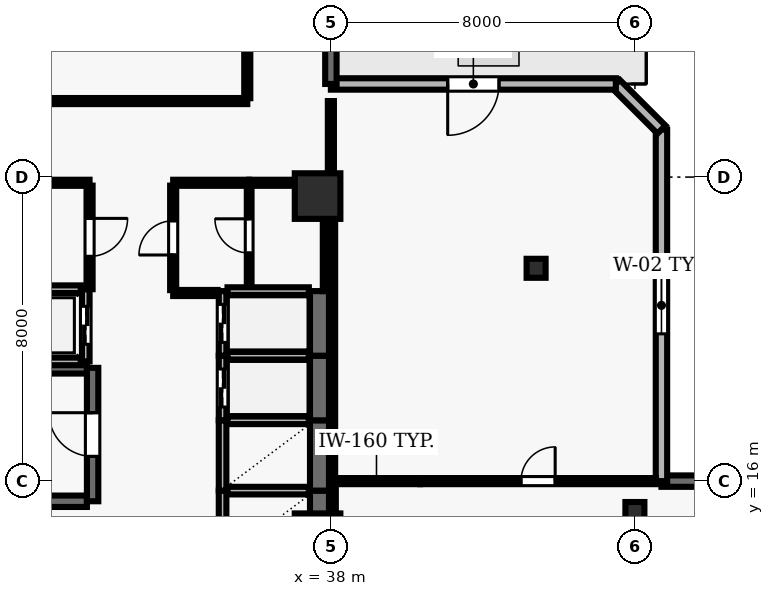
"""IFC4 building model, lengths in metres.
Left out: names, types, materials, properties, quantities, classifications, styles, units other than length and angle.
Written with IfcOpenShell. Run it as: python <this file> out.ifc"""

import sys

from ifc_helpers import new_model, si_unit, direction, frame, frame_2d, origin, origin_2d, place, context, subcontext, project, spatial, rectangle, hollow_rectangle, extrude, element, fill, save


model = new_model("IFC4")
c1 = context("Model", 3, precision=1e-05, world=origin(), true_north=direction((0.0, 1.0)))
c2 = subcontext(c1, "Body", "Model", "MODEL_VIEW")
j1 = project(units=[si_unit("LENGTHUNIT", "METRE"), si_unit("PLANEANGLEUNIT", "RADIAN")], contexts=[c1])
p1 = place(None, origin())
s1 = spatial("IfcSite", under=j1, at=p1, CompositionType="ELEMENT")
p2 = place(p1, origin())
s2 = spatial("IfcBuilding", under=s1, at=p2, CompositionType="ELEMENT")
p3 = place(p2, frame((0.0, 0.0, 134.6)))
s3 = spatial("IfcBuildingStorey", under=s2, at=p3, CompositionType="ELEMENT", Elevation=134.6)
for number, where, z_axis, x_axis in (
    (1, (37.65, 14.55, 0.0), (0.0, 0.0, 1.0), (1.0, 0.0, 0.0)),
    (2, (37.65, 23.5, 0.0), (0.0, 0.0, 1.0), (1.0, 0.0, 0.0)),
):
    element("IfcColumn", number, at=place(p3, frame(where, z_axis=z_axis, x_axis=x_axis)), inside=s3, PredefinedType="COLUMN", context=c2, shape_type="SweptSolid", body=[
        extrude(rectangle(XDim=1.2, YDim=1.2, at=origin_2d()), origin(), (0.0, 0.0, 1.0), 3.9),
    ])
for number, where, z_axis, x_axis in (
    (3, (46.0, 15.2, 0.0), (0.0, 0.0, 1.0), (1.0, 0.0, 0.0)),
    (4, (43.4, 21.6, 0.0), (0.0, 0.0, 1.0), (1.0, 0.0, 0.0)),
):
    element("IfcColumn", number, at=place(p3, frame(where, z_axis=z_axis, x_axis=x_axis)), inside=s3, PredefinedType="COLUMN", context=c2, shape_type="SweptSolid", body=[
        extrude(hollow_rectangle(XDim=0.5, YDim=0.5, WallThickness=0.025, at=origin_2d()), origin(), (0.0, 0.0, 1.0), 3.9),
    ])
p4 = place(p3, frame((68.1, 16.0, 0.0), z_axis=(0.0, 0.0, 1.0), x_axis=(-1.0, 0.0, 0.0)))
e5 = element("IfcWall", 5, at=p4, inside=s3, PredefinedType="SOLIDWALL", context=c2, shape_type="SweptSolid", body=[
    extrude(rectangle(XDim=21.401, YDim=0.3, at=frame_2d((10.701, 0.0))), origin(), (0.0, 0.0, 1.0), 3.69),
])
p5 = place(p4, frame((11.974, 0.0, 0.0)))
e6 = element("IfcOpeningElement", 6, at=p5, cuts=e5, PredefinedType="OPENING", context=c2, shape_type="SweptSolid", body=[
    extrude(rectangle(XDim=1.0, YDim=2.2, at=frame_2d((0.5, 1.1))), frame((0.0, 0.16, 0.0), z_axis=(0.0, -1.0, 0.0), x_axis=(1.0, 0.0, 0.0)), (0.0, 0.0, 1.0), 0.32),
])
p6 = place(p4, frame((2.967, 0.0, 0.9)))
e7 = element("IfcOpeningElement", 7, at=p6, cuts=e5, PredefinedType="OPENING", context=c2, shape_type="SweptSolid", body=[
    extrude(rectangle(XDim=1.2, YDim=1.6, at=frame_2d((0.6, 0.8))), frame((0.0, 0.16, 0.0), z_axis=(0.0, -1.0, 0.0), x_axis=(1.0, 0.0, 0.0)), (0.0, 0.0, 1.0), 0.32),
])
p7 = place(p4, frame((10.1, 0.0, 0.9)))
e8 = element("IfcOpeningElement", 8, at=p7, cuts=e5, PredefinedType="OPENING", context=c2, shape_type="SweptSolid", body=[
    extrude(rectangle(XDim=1.2, YDim=1.6, at=frame_2d((0.6, 0.8))), frame((0.0, 0.16, 0.0), z_axis=(0.0, -1.0, 0.0), x_axis=(1.0, 0.0, 0.0)), (0.0, 0.0, 1.0), 0.32),
])
p8 = place(p4, frame((17.234, 0.0, 0.9)))
e9 = element("IfcOpeningElement", 9, at=p8, cuts=e5, PredefinedType="OPENING", context=c2, shape_type="SweptSolid", body=[
    extrude(rectangle(XDim=1.2, YDim=1.6, at=frame_2d((0.6, 0.8))), frame((0.0, 0.16, 0.0), z_axis=(0.0, -1.0, 0.0), x_axis=(1.0, 0.0, 0.0)), (0.0, 0.0, 1.0), 0.32),
])
p9 = place(p3, frame((46.699, 16.0, 0.0), z_axis=(0.0, 0.0, 1.0), x_axis=(0.0, 1.0, 0.0)))
e10 = element("IfcWall", 10, at=p9, inside=s3, PredefinedType="SOLIDWALL", context=c2, shape_type="SweptSolid", body=[
    extrude(rectangle(XDim=9.25, YDim=0.3, at=frame_2d((4.625, 0.0))), origin(), (0.0, 0.0, 1.0), 3.69),
])
p10 = place(p9, frame((3.875, 0.0, 0.9)))
e11 = element("IfcOpeningElement", 11, at=p10, cuts=e10, PredefinedType="OPENING", context=c2, shape_type="SweptSolid", body=[
    extrude(rectangle(XDim=1.5, YDim=1.6, at=frame_2d((0.75, 0.8))), frame((0.0, 0.16, 0.0), z_axis=(0.0, -1.0, 0.0), x_axis=(1.0, 0.0, 0.0)), (0.0, 0.0, 1.0), 0.32),
])
p11 = place(p3, frame((46.699, 25.25, 0.0), z_axis=(0.0, 0.0, 1.0), x_axis=(-0.707106781187, 0.707106781187, 0.0)))
e12 = element("IfcWall", 12, at=p11, inside=s3, PredefinedType="SOLIDWALL", context=c2, shape_type="SweptSolid", body=[
    extrude(rectangle(XDim=1.697, YDim=0.3, at=frame_2d((0.849, 0.0))), origin(), (0.0, 0.0, 1.0), 3.69),
])
p12 = place(p3, frame((45.499, 26.45, 0.0), z_axis=(0.0, 0.0, 1.0), x_axis=(-1.0, 0.0, 0.0)))
e13 = element("IfcWall", 13, at=p12, inside=s3, PredefinedType="SOLIDWALL", context=c2, shape_type="SweptSolid", body=[
    extrude(rectangle(XDim=7.499, YDim=0.3, at=frame_2d((3.75, 0.0))), origin(), (0.0, 0.0, 1.0), 3.69),
])
p13 = place(p12, frame((3.075, 0.0, 0.0)))
e14 = element("IfcOpeningElement", 14, at=p13, cuts=e13, PredefinedType="OPENING", context=c2, shape_type="SweptSolid", body=[
    extrude(rectangle(XDim=1.35, YDim=2.2, at=frame_2d((0.675, 1.1))), frame((0.0, 0.16, 0.0), z_axis=(0.0, -1.0, 0.0), x_axis=(1.0, 0.0, 0.0)), (0.0, 0.0, 1.0), 0.32),
])
p14 = place(p3, frame((38.0, 26.45, 0.0), z_axis=(0.0, 0.0, 1.0), x_axis=(0.0, 1.0, 0.0)))
e15 = element("IfcWall", 15, at=p14, inside=s3, PredefinedType="SOLIDWALL", context=c2, shape_type="SweptSolid", body=[
    extrude(rectangle(XDim=19.65, YDim=0.3, at=frame_2d((9.825, 0.0))), origin(), (0.0, 0.0, 1.0), 3.69),
])
p15 = place(p14, frame((11.25, 0.0, 0.0)))
e16 = element("IfcOpeningElement", 16, at=p15, cuts=e15, PredefinedType="OPENING", context=c2, shape_type="SweptSolid", body=[
    extrude(rectangle(XDim=1.0, YDim=2.2, at=frame_2d((0.5, 1.1))), frame((0.0, 0.16, 0.0), z_axis=(0.0, -1.0, 0.0), x_axis=(1.0, 0.0, 0.0)), (0.0, 0.0, 1.0), 0.32),
])
p16 = place(p14, frame((15.625, 0.0, 0.9)))
e17 = element("IfcOpeningElement", 17, at=p16, cuts=e15, PredefinedType="OPENING", context=c2, shape_type="SweptSolid", body=[
    extrude(rectangle(XDim=2.4, YDim=1.6, at=frame_2d((1.2, 0.8))), frame((0.0, 0.16, 0.0), z_axis=(0.0, -1.0, 0.0), x_axis=(1.0, 0.0, 0.0)), (0.0, 0.0, 1.0), 0.32),
])
for number, where, z_axis, x_axis in (
    (18, (31.58, 18.98, 0.0), (0.0, 0.0, 1.0), (-1.0, 0.0, 0.0)),
    (19, (23.22, 15.47, 0.0), (0.0, 0.0, 1.0), (1.0, 0.0, 0.0)),
):
    element("IfcWall", number, at=place(p3, frame(where, z_axis=z_axis, x_axis=x_axis)), inside=s3, PredefinedType="SHEAR", context=c2, shape_type="SweptSolid", body=[
        extrude(rectangle(XDim=8.36, YDim=0.3, at=frame_2d((4.18, 0.0))), origin(), (0.0, 0.0, 1.0), 3.69),
    ])
p17 = place(p3, frame((31.73, 15.47, 0.0), z_axis=(0.0, 0.0, 1.0), x_axis=(0.0, 1.0, 0.0)))
e20 = element("IfcWall", 20, at=p17, inside=s3, PredefinedType="SHEAR", context=c2, shape_type="SweptSolid", body=[
    extrude(rectangle(XDim=3.51, YDim=0.3, at=frame_2d((1.755, 0.0))), origin(), (0.0, 0.0, 1.0), 3.69),
])
p18 = place(p17, frame((1.18, 0.0, 0.0)))
e21 = element("IfcOpeningElement", 21, at=p18, cuts=e20, PredefinedType="OPENING", context=c2, shape_type="SweptSolid", body=[
    extrude(rectangle(XDim=1.15, YDim=2.15, at=frame_2d((0.575, 1.075))), frame((0.0, 0.16, 0.0), z_axis=(0.0, -1.0, 0.0), x_axis=(1.0, 0.0, 0.0)), (0.0, 0.0, 1.0), 0.32),
])
p19 = place(p3, frame((35.15, 15.75, 0.0), z_axis=(0.0, 0.0, 1.0), x_axis=(0.0, -1.0, 0.0)))
e22 = element("IfcWall", 22, at=p19, inside=s3, PredefinedType="SOLIDWALL", context=c2, shape_type="SweptSolid", body=[
    extrude(rectangle(XDim=1.85, YDim=0.2, at=frame_2d((0.925, 0.0))), origin(), (0.0, 0.0, 1.0), 3.69),
])
p20 = place(p3, frame((37.7, 13.9, 0.0), z_axis=(0.0, 0.0, 1.0), x_axis=(0.0, 1.0, 0.0)))
e23 = element("IfcWall", 23, at=p20, inside=s3, PredefinedType="SHEAR", context=c2, shape_type="SweptSolid", body=[
    extrude(rectangle(XDim=1.85, YDim=0.5, at=frame_2d((0.925, 0.0))), origin(), (0.0, 0.0, 1.0), 3.69),
])
p21 = place(p3, frame((37.42, 15.75, 0.0), z_axis=(0.0, 0.0, 1.0), x_axis=(-1.0, 0.0, 0.0)))
e24 = element("IfcWall", 24, at=p21, inside=s3, PredefinedType="SOLIDWALL", context=c2, shape_type="SweptSolid", body=[
    extrude(rectangle(XDim=2.14, YDim=0.2, at=frame_2d((1.07, 0.0))), origin(), (0.0, 0.0, 1.0), 3.69),
])
p22 = place(p3, frame((35.15, 17.6, 0.0), z_axis=(0.0, 0.0, 1.0), x_axis=(0.0, -1.0, 0.0)))
e25 = element("IfcWall", 25, at=p22, inside=s3, PredefinedType="SOLIDWALL", context=c2, shape_type="SweptSolid", body=[
    extrude(rectangle(XDim=1.85, YDim=0.2, at=frame_2d((0.925, 0.0))), origin(), (0.0, 0.0, 1.0), 3.69),
])
p23 = place(p3, frame((37.7, 15.75, 0.0), z_axis=(0.0, 0.0, 1.0), x_axis=(0.0, 1.0, 0.0)))
e26 = element("IfcWall", 26, at=p23, inside=s3, PredefinedType="SHEAR", context=c2, shape_type="SweptSolid", body=[
    extrude(rectangle(XDim=1.85, YDim=0.5, at=frame_2d((0.925, 0.0))), origin(), (0.0, 0.0, 1.0), 3.69),
])
p24 = place(p3, frame((37.42, 17.6, 0.0), z_axis=(0.0, 0.0, 1.0), x_axis=(-1.0, 0.0, 0.0)))
e27 = element("IfcWall", 27, at=p24, inside=s3, PredefinedType="SOLIDWALL", context=c2, shape_type="SweptSolid", body=[
    extrude(rectangle(XDim=2.14, YDim=0.2, at=frame_2d((1.07, 0.0))), origin(), (0.0, 0.0, 1.0), 3.69),
])
p25 = place(p3, frame((35.15, 19.3, 0.0), z_axis=(0.0, 0.0, 1.0), x_axis=(0.0, -1.0, 0.0)))
e28 = element("IfcWall", 28, at=p25, inside=s3, PredefinedType="SOLIDWALL", context=c2, shape_type="SweptSolid", body=[
    extrude(rectangle(XDim=1.7, YDim=0.2, at=frame_2d((0.85, 0.0))), origin(), (0.0, 0.0, 1.0), 3.69),
])
p26 = place(p25, frame((0.35, 0.0, 0.0)))
e29 = element("IfcOpeningElement", 29, at=p26, cuts=e28, PredefinedType="OPENING", context=c2, shape_type="SweptSolid", body=[
    extrude(rectangle(XDim=1.0, YDim=2.1, at=frame_2d((0.5, 1.05))), frame((0.0, 0.11, 0.0), z_axis=(0.0, -1.0, 0.0), x_axis=(1.0, 0.0, 0.0)), (0.0, 0.0, 1.0), 0.22),
])
p27 = place(p3, frame((37.7, 17.6, 0.0), z_axis=(0.0, 0.0, 1.0), x_axis=(0.0, 1.0, 0.0)))
e30 = element("IfcWall", 30, at=p27, inside=s3, PredefinedType="SHEAR", context=c2, shape_type="SweptSolid", body=[
    extrude(rectangle(XDim=1.7, YDim=0.5, at=frame_2d((0.85, 0.0))), origin(), (0.0, 0.0, 1.0), 3.69),
])
p28 = place(p3, frame((37.42, 19.3, 0.0), z_axis=(0.0, 0.0, 1.0), x_axis=(-1.0, 0.0, 0.0)))
e31 = element("IfcWall", 31, at=p28, inside=s3, PredefinedType="SOLIDWALL", context=c2, shape_type="SweptSolid", body=[
    extrude(rectangle(XDim=2.14, YDim=0.2, at=frame_2d((1.07, 0.0))), origin(), (0.0, 0.0, 1.0), 3.69),
])
p29 = place(p3, frame((35.15, 21.0, 0.0), z_axis=(0.0, 0.0, 1.0), x_axis=(0.0, -1.0, 0.0)))
e32 = element("IfcWall", 32, at=p29, inside=s3, PredefinedType="SOLIDWALL", context=c2, shape_type="SweptSolid", body=[
    extrude(rectangle(XDim=1.7, YDim=0.2, at=frame_2d((0.85, 0.0))), origin(), (0.0, 0.0, 1.0), 3.69),
])
p30 = place(p29, frame((0.35, 0.0, 0.0)))
e33 = element("IfcOpeningElement", 33, at=p30, cuts=e32, PredefinedType="OPENING", context=c2, shape_type="SweptSolid", body=[
    extrude(rectangle(XDim=1.0, YDim=2.1, at=frame_2d((0.5, 1.05))), frame((0.0, 0.11, 0.0), z_axis=(0.0, -1.0, 0.0), x_axis=(1.0, 0.0, 0.0)), (0.0, 0.0, 1.0), 0.22),
])
p31 = place(p3, frame((37.7, 19.3, 0.0), z_axis=(0.0, 0.0, 1.0), x_axis=(0.0, 1.0, 0.0)))
e34 = element("IfcWall", 34, at=p31, inside=s3, PredefinedType="SHEAR", context=c2, shape_type="SweptSolid", body=[
    extrude(rectangle(XDim=1.7, YDim=0.5, at=frame_2d((0.85, 0.0))), origin(), (0.0, 0.0, 1.0), 3.69),
])
p32 = place(p3, frame((37.42, 21.0, 0.0), z_axis=(0.0, 0.0, 1.0), x_axis=(-1.0, 0.0, 0.0)))
e35 = element("IfcWall", 35, at=p32, inside=s3, PredefinedType="SOLIDWALL", context=c2, shape_type="SweptSolid", body=[
    extrude(rectangle(XDim=2.14, YDim=0.2, at=frame_2d((1.07, 0.0))), origin(), (0.0, 0.0, 1.0), 3.69),
])
p33 = place(p3, frame((31.55, 19.15, 0.0), z_axis=(0.0, 0.0, 1.0), x_axis=(0.0, 1.0, 0.0)))
e36 = element("IfcWall", 36, at=p33, inside=s3, PredefinedType="SOLIDWALL", context=c2, shape_type="SweptSolid", body=[
    extrude(rectangle(XDim=1.9, YDim=0.2, at=frame_2d((0.95, 0.0))), origin(), (0.0, 0.0, 1.0), 3.69),
])
p34 = place(p33, frame((0.45, 0.0, 0.0)))
e37 = element("IfcOpeningElement", 37, at=p34, cuts=e36, PredefinedType="OPENING", context=c2, shape_type="SweptSolid", body=[
    extrude(rectangle(XDim=1.0, YDim=2.1, at=frame_2d((0.5, 1.05))), frame((0.0, 0.11, 0.0), z_axis=(0.0, -1.0, 0.0), x_axis=(1.0, 0.0, 0.0)), (0.0, 0.0, 1.0), 0.22),
])
for number, where, z_axis, x_axis in (
    (38, (28.98, 19.15, 0.0), (0.0, 0.0, 1.0), (1.0, 0.0, 0.0)),
    (39, (31.42, 21.05, 0.0), (0.0, 0.0, 1.0), (-1.0, 0.0, 0.0)),
):
    element("IfcWall", number, at=place(p3, frame(where, z_axis=z_axis, x_axis=x_axis)), inside=s3, PredefinedType="SOLIDWALL", context=c2, shape_type="SweptSolid", body=[
        extrude(rectangle(XDim=2.44, YDim=0.2, at=frame_2d((1.22, 0.0))), origin(), (0.0, 0.0, 1.0), 3.69),
    ])
p35 = place(p3, frame((31.65, 23.85, 0.0), z_axis=(0.0, 0.0, 1.0), x_axis=(-1.0, 0.0, 0.0)))
e40 = element("IfcWall", 40, at=p35, inside=s3, PredefinedType="PARTITIONING", context=c2, shape_type="SweptSolid", body=[
    extrude(rectangle(XDim=2.85, YDim=0.16, at=frame_2d((1.425, 0.0))), origin(), (0.0, 0.0, 1.0), 3.074),
])
p36 = place(p3, frame((35.02, 20.95, 0.0), z_axis=(0.0, 0.0, 1.0), x_axis=(-1.0, 0.0, 0.0)))
e41 = element("IfcWall", 41, at=p36, inside=s3, PredefinedType="PARTITIONING", context=c2, shape_type="SweptSolid", body=[
    extrude(rectangle(XDim=1.17, YDim=0.16, at=frame_2d((0.585, 0.0))), origin(), (0.0, 0.0, 1.0), 3.69),
])
p37 = place(p3, frame((35.8, 26.0, 0.0), z_axis=(0.0, 0.0, 1.0), x_axis=(-1.0, 0.0, 0.0)))
e42 = element("IfcWall", 42, at=p37, inside=s3, PredefinedType="PARTITIONING", context=c2, shape_type="SweptSolid", body=[
    extrude(rectangle(XDim=13.655, YDim=0.16, at=frame_2d((6.828, 0.0))), origin(), (0.0, 0.0, 1.0), 3.69),
])
p38 = place(p37, frame((6.377, 0.0, 0.0)))
e43 = element("IfcOpeningElement", 43, at=p38, cuts=e42, PredefinedType="OPENING", context=c2, shape_type="SweptSolid", body=[
    extrude(rectangle(XDim=0.9, YDim=2.1, at=frame_2d((0.45, 1.05))), frame((0.0, 0.09, 0.0), z_axis=(0.0, -1.0, 0.0), x_axis=(1.0, 0.0, 0.0)), (0.0, 0.0, 1.0), 0.18),
])
for number, where, z_axis, x_axis in (
    (44, (35.85, 23.85, 0.0), (0.0, 0.0, 1.0), (-1.0, 0.0, 0.0)),
    (45, (37.85, 23.85, 0.0), (0.0, 0.0, 1.0), (-1.0, 0.0, 0.0)),
):
    element("IfcWall", number, at=place(p3, frame(where, z_axis=z_axis, x_axis=x_axis)), inside=s3, PredefinedType="PARTITIONING", context=c2, shape_type="SweptSolid", body=[
        extrude(rectangle(XDim=2.0, YDim=0.16, at=frame_2d((1.0, 0.0))), origin(), (0.0, 0.0, 1.0), 3.074),
    ])
p39 = place(p3, frame((40.35, 16.0, 0.0), z_axis=(0.0, 0.0, 1.0), x_axis=(-1.0, 0.0, 0.0)))
e46 = element("IfcWall", 46, at=p39, inside=s3, PredefinedType="PARTITIONING", context=c2, shape_type="SweptSolid", body=[
    extrude(rectangle(XDim=2.3, YDim=0.16, at=frame_2d((1.15, 0.0))), origin(), (0.0, 0.0, 1.0), 3.69),
])
p40 = place(p3, frame((40.35, 16.0, 0.0), z_axis=(0.0, 0.0, 1.0), x_axis=(1.0, 0.0, 0.0)))
e47 = element("IfcWall", 47, at=p40, inside=s3, PredefinedType="PARTITIONING", context=c2, shape_type="SweptSolid", body=[
    extrude(rectangle(XDim=6.204, YDim=0.16, at=frame_2d((3.102, 0.0))), origin(), (0.0, 0.0, 1.0), 3.39),
])
p41 = place(p40, frame((2.652, 0.0, 0.0)))
e48 = element("IfcOpeningElement", 48, at=p41, cuts=e47, PredefinedType="OPENING", context=c2, shape_type="SweptSolid", body=[
    extrude(rectangle(XDim=0.9, YDim=2.1, at=frame_2d((0.45, 1.05))), frame((0.0, 0.09, 0.0), z_axis=(0.0, -1.0, 0.0), x_axis=(1.0, 0.0, 0.0)), (0.0, 0.0, 1.0), 0.18),
])
p42 = place(p3, frame((31.65, 23.775, 0.0), z_axis=(0.0, 0.0, 1.0), x_axis=(0.0, -1.0, 0.0)))
e49 = element("IfcWall", 49, at=p42, inside=s3, PredefinedType="PARTITIONING", context=c2, shape_type="SweptSolid", body=[
    extrude(rectangle(XDim=2.725, YDim=0.16, at=frame_2d((1.362, 0.0))), origin(), (0.0, 0.0, 1.0), 3.69),
])
p43 = place(p42, frame((0.862, 0.0, 0.0)))
e50 = element("IfcOpeningElement", 50, at=p43, cuts=e49, PredefinedType="OPENING", context=c2, shape_type="SweptSolid", body=[
    extrude(rectangle(XDim=1.0, YDim=2.1, at=frame_2d((0.5, 1.05))), frame((0.0, 0.09, 0.0), z_axis=(0.0, -1.0, 0.0), x_axis=(1.0, 0.0, 0.0)), (0.0, 0.0, 1.0), 0.18),
])
p44 = place(p3, frame((33.85, 21.025, 0.0), z_axis=(0.0, 0.0, 1.0), x_axis=(0.0, 1.0, 0.0)))
e51 = element("IfcWall", 51, at=p44, inside=s3, PredefinedType="PARTITIONING", context=c2, shape_type="SweptSolid", body=[
    extrude(rectangle(XDim=2.75, YDim=0.16, at=frame_2d((1.375, 0.0))), origin(), (0.0, 0.0, 1.0), 3.69),
])
p45 = place(p44, frame((0.925, 0.0, 0.0)))
e52 = element("IfcOpeningElement", 52, at=p45, cuts=e51, PredefinedType="OPENING", context=c2, shape_type="SweptSolid", body=[
    extrude(rectangle(XDim=0.9, YDim=2.1, at=frame_2d((0.45, 1.05))), frame((0.0, 0.09, 0.0), z_axis=(0.0, -1.0, 0.0), x_axis=(1.0, 0.0, 0.0)), (0.0, 0.0, 1.0), 0.18),
])
p46 = place(p3, frame((35.8, 37.693, 0.0), z_axis=(0.0, 0.0, 1.0), x_axis=(0.0, -1.0, 0.0)))
e53 = element("IfcWall", 53, at=p46, inside=s3, PredefinedType="PARTITIONING", context=c2, shape_type="SweptSolid", body=[
    extrude(rectangle(XDim=11.618, YDim=0.16, at=frame_2d((5.809, 0.0))), origin(), (0.0, 0.0, 1.0), 3.69),
])
p47 = place(p3, frame((35.85, 21.13, 0.0), z_axis=(0.0, 0.0, 1.0), x_axis=(0.0, 1.0, 0.0)))
e54 = element("IfcWall", 54, at=p47, inside=s3, PredefinedType="PARTITIONING", context=c2, shape_type="SweptSolid", body=[
    extrude(rectangle(XDim=2.645, YDim=0.125, at=frame_2d((1.323, 0.0))), origin(), (0.0, 0.0, 1.0), 3.69),
])
p48 = place(p47, frame((0.872, 0.0, 0.0)))
e55 = element("IfcOpeningElement", 55, at=p48, cuts=e54, PredefinedType="OPENING", context=c2, shape_type="SweptSolid", body=[
    extrude(rectangle(XDim=0.9, YDim=2.1, at=frame_2d((0.45, 1.05))), frame((0.0, 0.073, 0.0), z_axis=(0.0, -1.0, 0.0), x_axis=(1.0, 0.0, 0.0)), (0.0, 0.0, 1.0), 0.145),
])
p49 = place(p3, frame((37.85, 21.0, 0.0), z_axis=(0.0, 0.0, 1.0), x_axis=(0.0, 1.0, 0.0)))
e56 = element("IfcWall", 56, at=p49, inside=s3, PredefinedType="PARTITIONING", context=c2, shape_type="SweptSolid", body=[
    extrude(rectangle(XDim=2.775, YDim=0.125, at=frame_2d((1.387, 0.0))), origin(), (0.0, 0.0, 1.0), 3.074),
])
p50 = place(p3, frame((38.0, 23.85, 0.0), z_axis=(0.0, 0.0, 1.0), x_axis=(0.0, 1.0, 0.0)))
e57 = element("IfcWall", 57, at=p50, inside=s3, PredefinedType="PARTITIONING", context=c2, shape_type="SweptSolid", body=[
    extrude(rectangle(XDim=2.15, YDim=0.16, at=frame_2d((1.075, 0.0))), origin(), (0.0, 0.0, 1.0), 3.074),
])
p51 = place(p3, frame((38.05, 15.925, 0.0), z_axis=(0.0, 0.0, 1.0), x_axis=(0.0, -1.0, 0.0)))
e58 = element("IfcWall", 58, at=p51, inside=s3, PredefinedType="PARTITIONING", context=c2, shape_type="SweptSolid", body=[
    extrude(rectangle(XDim=6.375, YDim=0.16, at=frame_2d((3.188, 0.0))), origin(), (0.0, 0.0, 1.0), 3.074),
])
p52 = place(p3, frame((38.05, 23.85, 0.0), z_axis=(0.0, 0.0, 1.0), x_axis=(0.0, -1.0, 0.0)))
e59 = element("IfcWall", 59, at=p52, inside=s3, PredefinedType="PARTITIONING", context=c2, shape_type="SweptSolid", body=[
    extrude(rectangle(XDim=7.775, YDim=0.125, at=frame_2d((3.888, 0.0))), origin(), (0.0, 0.0, 1.0), 3.074),
])
p53 = place(p10, origin())
e60 = element("IfcWindow", 60, at=p53, inside=s3, PartitioningType="SINGLE_PANEL", PredefinedType="WINDOW", context=c2, shape_type="SweptSolid", body=[
    extrude(rectangle(XDim=1.5, YDim=1.6, at=frame_2d((0.75, 0.8))), frame((0.0, 0.03, 0.0), z_axis=(0.0, -1.0, 0.0), x_axis=(1.0, 0.0, 0.0)), (0.0, 0.0, 1.0), 0.06),
])
fill(e11, e60)
p54 = place(p13, origin())
e61 = element("IfcDoor", 61, at=p54, inside=s3, OperationType="SINGLE_SWING_RIGHT", PredefinedType="DOOR", context=c2, shape_type="SweptSolid", body=[
    extrude(rectangle(XDim=1.35, YDim=2.2, at=frame_2d((0.675, 1.1))), frame((0.0, 0.025, 0.0), z_axis=(0.0, -1.0, 0.0), x_axis=(1.0, 0.0, 0.0)), (0.0, 0.0, 1.0), 0.05),
])
fill(e14, e61)
p55 = place(p18, origin())
e62 = element("IfcDoor", 62, at=p55, inside=s3, OperationType="SINGLE_SWING_RIGHT", PredefinedType="DOOR", context=c2, shape_type="SweptSolid", body=[
    extrude(rectangle(XDim=1.15, YDim=2.15, at=frame_2d((0.575, 1.075))), frame((0.0, 0.025, 0.0), z_axis=(0.0, -1.0, 0.0), x_axis=(1.0, 0.0, 0.0)), (0.0, 0.0, 1.0), 0.05),
])
fill(e21, e62)
p56 = place(p26, origin())
e63 = element("IfcDoor", 63, at=p56, inside=s3, OperationType="DOUBLE_DOOR_SLIDING", PredefinedType="DOOR", context=c2, shape_type="SweptSolid", body=[
    extrude(rectangle(XDim=1.0, YDim=2.1, at=frame_2d((0.5, 1.05))), frame((0.0, 0.025, 0.0), z_axis=(0.0, -1.0, 0.0), x_axis=(1.0, 0.0, 0.0)), (0.0, 0.0, 1.0), 0.05),
])
fill(e29, e63)
p57 = place(p30, origin())
e64 = element("IfcDoor", 64, at=p57, inside=s3, OperationType="DOUBLE_DOOR_SLIDING", PredefinedType="DOOR", context=c2, shape_type="SweptSolid", body=[
    extrude(rectangle(XDim=1.0, YDim=2.1, at=frame_2d((0.5, 1.05))), frame((0.0, 0.025, 0.0), z_axis=(0.0, -1.0, 0.0), x_axis=(1.0, 0.0, 0.0)), (0.0, 0.0, 1.0), 0.05),
])
fill(e33, e64)
p58 = place(p34, origin())
e65 = element("IfcDoor", 65, at=p58, inside=s3, OperationType="DOUBLE_DOOR_SLIDING", PredefinedType="DOOR", context=c2, shape_type="SweptSolid", body=[
    extrude(rectangle(XDim=1.0, YDim=2.1, at=frame_2d((0.5, 1.05))), frame((0.0, 0.025, 0.0), z_axis=(0.0, -1.0, 0.0), x_axis=(1.0, 0.0, 0.0)), (0.0, 0.0, 1.0), 0.05),
])
fill(e37, e65)
p59 = place(p45, origin())
e66 = element("IfcDoor", 66, at=p59, inside=s3, OperationType="SINGLE_SWING_LEFT", PredefinedType="DOOR", context=c2, shape_type="SweptSolid", body=[
    extrude(rectangle(XDim=0.9, YDim=2.1, at=frame_2d((0.45, 1.05))), frame((0.0, 0.025, 0.0), z_axis=(0.0, -1.0, 0.0), x_axis=(1.0, 0.0, 0.0)), (0.0, 0.0, 1.0), 0.05),
])
fill(e52, e66)
p60 = place(p48, origin())
e67 = element("IfcDoor", 67, at=p60, inside=s3, OperationType="SINGLE_SWING_RIGHT", PredefinedType="DOOR", context=c2, shape_type="SweptSolid", body=[
    extrude(rectangle(XDim=0.9, YDim=2.1, at=frame_2d((0.45, 1.05))), frame((0.0, 0.025, 0.0), z_axis=(0.0, -1.0, 0.0), x_axis=(1.0, 0.0, 0.0)), (0.0, 0.0, 1.0), 0.05),
])
fill(e55, e67)
p61 = place(p43, origin())
e68 = element("IfcDoor", 68, at=p61, inside=s3, OperationType="SINGLE_SWING_LEFT", PredefinedType="DOOR", context=c2, shape_type="SweptSolid", body=[
    extrude(rectangle(XDim=1.0, YDim=2.1, at=frame_2d((0.5, 1.05))), frame((0.0, 0.025, 0.0), z_axis=(0.0, -1.0, 0.0), x_axis=(1.0, 0.0, 0.0)), (0.0, 0.0, 1.0), 0.05),
])
fill(e50, e68)
p62 = place(p41, origin())
e69 = element("IfcDoor", 69, at=p62, inside=s3, OperationType="SINGLE_SWING_RIGHT", PredefinedType="DOOR", context=c2, shape_type="SweptSolid", body=[
    extrude(rectangle(XDim=0.9, YDim=2.1, at=frame_2d((0.45, 1.05))), frame((0.0, 0.025, 0.0), z_axis=(0.0, -1.0, 0.0), x_axis=(1.0, 0.0, 0.0)), (0.0, 0.0, 1.0), 0.05),
])
fill(e48, e69)
save(model, sys.argv[1])
